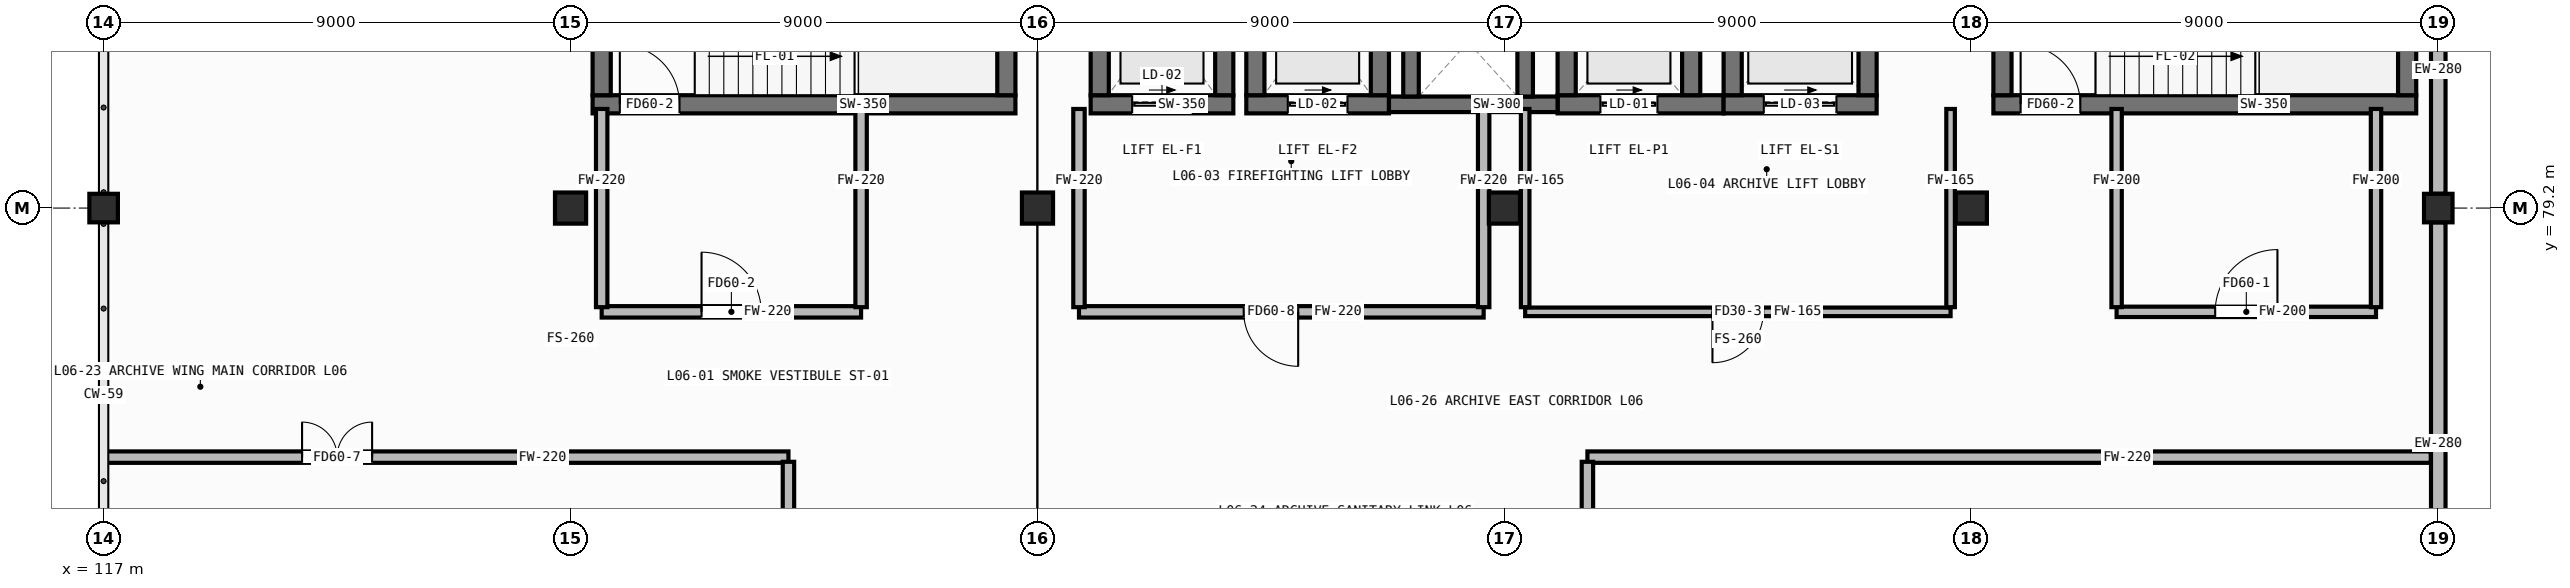
"""IFC4 building model, lengths in metres.
Left out: names, types, materials, properties, quantities, classifications, styles, units other than length and angle.
Written with IfcOpenShell. Run it as: python <this file> out.ifc"""

import sys

from ifc_helpers import new_model, si_unit, direction, frame, frame_2d, origin, origin_2d, place, context, subcontext, project, spatial, rectangle, hollow_rectangle, extrude, element, fill, save


model = new_model("IFC4")
c1 = context("Model", 3, precision=1e-05, world=origin(), true_north=direction((0.0, 1.0)))
c2 = subcontext(c1, "Body", "Model", "MODEL_VIEW")
j1 = project(units=[si_unit("LENGTHUNIT", "METRE"), si_unit("PLANEANGLEUNIT", "RADIAN")], contexts=[c1])
p1 = place(None, origin())
s1 = spatial("IfcSite", under=j1, at=p1, CompositionType="ELEMENT")
p2 = place(p1, origin())
s2 = spatial("IfcBuilding", under=s1, at=p2, CompositionType="ELEMENT")
p3 = place(p2, frame((0.0, 0.0, 20.6)))
s3 = spatial("IfcBuildingStorey", under=s2, at=p3, CompositionType="ELEMENT", Elevation=20.6)
p4 = place(p3, frame((117.0, 79.2, 0.0), z_axis=(0.0, 0.0, 1.0), x_axis=(1.0, 0.0, 0.0)))
e1 = element("IfcColumn", 1, at=p4, inside=s3, PredefinedType="COLUMN", context=c2, shape_type="SweptSolid", body=[
    extrude(hollow_rectangle(XDim=0.55, YDim=0.55, WallThickness=0.022, at=origin_2d()), origin(), (0.0, 0.0, 1.0), 3.36),
])
for number, where, z_axis, x_axis in (
    (2, (126.0, 79.2, 0.0), (0.0, 0.0, 1.0), (1.0, 0.0, 0.0)),
    (3, (135.0, 79.2, 0.0), (0.0, 0.0, 1.0), (1.0, 0.0, 0.0)),
    (4, (144.0, 79.2, 0.0), (0.0, 0.0, 1.0), (1.0, 0.0, 0.0)),
    (5, (153.0, 79.2, 0.0), (0.0, 0.0, 1.0), (1.0, 0.0, 0.0)),
):
    element("IfcColumn", number, at=place(p3, frame(where, z_axis=z_axis, x_axis=x_axis)), inside=s3, PredefinedType="COLUMN", context=c2, shape_type="SweptSolid", body=[
        extrude(hollow_rectangle(XDim=0.6, YDim=0.6, WallThickness=0.025, at=origin_2d()), origin(), (0.0, 0.0, 1.0), 3.6),
    ])
p5 = place(p3, frame((162.0, 79.2, 0.0), z_axis=(0.0, 0.0, 1.0), x_axis=(1.0, 0.0, 0.0)))
e6 = element("IfcColumn", 6, at=p5, inside=s3, PredefinedType="COLUMN", context=c2, shape_type="SweptSolid", body=[
    extrude(hollow_rectangle(XDim=0.55, YDim=0.55, WallThickness=0.022, at=origin_2d()), origin(), (0.0, 0.0, 1.0), 3.6),
])
p6 = place(p3, frame((162.0, 78.925, 0.0), z_axis=(0.0, 0.0, 1.0), x_axis=(0.0, -1.0, 0.0)))
e7 = element("IfcWall", 7, at=p6, inside=s3, PredefinedType="STANDARD", context=c2, shape_type="SweptSolid", body=[
    extrude(rectangle(XDim=6.65, YDim=0.28, at=frame_2d((3.325, 0.0))), origin(), (0.0, 0.0, 1.0), 2.92),
])
p7 = place(p3, frame((162.0, 86.125, 0.0), z_axis=(0.0, 0.0, 1.0), x_axis=(0.0, -1.0, 0.0)))
e8 = element("IfcWall", 8, at=p7, inside=s3, PredefinedType="STANDARD", context=c2, shape_type="SweptSolid", body=[
    extrude(rectangle(XDim=6.65, YDim=0.28, at=frame_2d((3.325, 0.0))), origin(), (0.0, 0.0, 1.0), 2.92),
])
p8 = place(p3, frame((126.425, 81.2, 0.0), z_axis=(0.0, 0.0, 1.0), x_axis=(1.0, 0.0, 0.0)))
e9 = element("IfcWall", 9, at=p8, inside=s3, PredefinedType="SHEAR", context=c2, shape_type="SweptSolid", body=[
    extrude(rectangle(XDim=8.15, YDim=0.35, at=frame_2d((4.075, 0.0))), origin(), (0.0, 0.0, 1.0), 3.32),
])
p9 = place(p8, frame((0.525, 0.0, 0.0)))
e10 = element("IfcOpeningElement", 10, at=p9, cuts=e9, PredefinedType="OPENING", context=c2, shape_type="SweptSolid", body=[
    extrude(rectangle(XDim=1.15, YDim=2.1, at=frame_2d((0.575, 1.05))), frame((0.0, 0.187, 0.0), z_axis=(0.0, -1.0, 0.0), x_axis=(1.0, 0.0, 0.0)), (0.0, 0.0, 1.0), 0.374),
])
for number, where, z_axis, x_axis in (
    (11, (126.6, 81.375, 0.0), (0.0, 0.0, 1.0), (0.0, 1.0, 0.0)),
    (12, (134.4, 81.375, 0.0), (0.0, 0.0, 1.0), (0.0, 1.0, 0.0)),
):
    element("IfcWall", number, at=place(p3, frame(where, z_axis=z_axis, x_axis=x_axis)), inside=s3, PredefinedType="SHEAR", context=c2, shape_type="SweptSolid", body=[
        extrude(rectangle(XDim=3.55, YDim=0.35, at=frame_2d((1.775, 0.0))), origin(), (0.0, 0.0, 1.0), 3.32),
    ])
p10 = place(p3, frame((153.425, 81.2, 0.0), z_axis=(0.0, 0.0, 1.0), x_axis=(1.0, 0.0, 0.0)))
e13 = element("IfcWall", 13, at=p10, inside=s3, PredefinedType="SHEAR", context=c2, shape_type="SweptSolid", body=[
    extrude(rectangle(XDim=8.15, YDim=0.35, at=frame_2d((4.075, 0.0))), origin(), (0.0, 0.0, 1.0), 3.32),
])
p11 = place(p10, frame((0.525, 0.0, 0.0)))
e14 = element("IfcOpeningElement", 14, at=p11, cuts=e13, PredefinedType="OPENING", context=c2, shape_type="SweptSolid", body=[
    extrude(rectangle(XDim=1.15, YDim=2.1, at=frame_2d((0.575, 1.05))), frame((0.0, 0.187, 0.0), z_axis=(0.0, -1.0, 0.0), x_axis=(1.0, 0.0, 0.0)), (0.0, 0.0, 1.0), 0.374),
])
for number, where, z_axis, x_axis in (
    (15, (153.6, 81.375, 0.0), (0.0, 0.0, 1.0), (0.0, 1.0, 0.0)),
    (16, (161.4, 81.375, 0.0), (0.0, 0.0, 1.0), (0.0, 1.0, 0.0)),
):
    element("IfcWall", number, at=place(p3, frame(where, z_axis=z_axis, x_axis=x_axis)), inside=s3, PredefinedType="SHEAR", context=c2, shape_type="SweptSolid", body=[
        extrude(rectangle(XDim=3.55, YDim=0.35, at=frame_2d((1.775, 0.0))), origin(), (0.0, 0.0, 1.0), 3.32),
    ])
p12 = place(p3, frame((136.025, 81.2, 0.0), z_axis=(0.0, 0.0, 1.0), x_axis=(1.0, 0.0, 0.0)))
e17 = element("IfcWall", 17, at=p12, inside=s3, PredefinedType="SHEAR", context=c2, shape_type="SweptSolid", body=[
    extrude(rectangle(XDim=2.75, YDim=0.35, at=frame_2d((1.375, 0.0))), origin(), (0.0, 0.0, 1.0), 3.32),
])
p13 = place(p12, frame((0.8, 0.0, 0.0)))
e18 = element("IfcOpeningElement", 18, at=p13, cuts=e17, PredefinedType="OPENING", context=c2, shape_type="SweptSolid", body=[
    extrude(rectangle(XDim=1.15, YDim=2.12, at=frame_2d((0.575, 1.06))), frame((0.0, 0.187, 0.0), z_axis=(0.0, -1.0, 0.0), x_axis=(1.0, 0.0, 0.0)), (0.0, 0.0, 1.0), 0.374),
])
for number, where, z_axis, x_axis in (
    (19, (136.2, 81.375, 0.0), (0.0, 0.0, 1.0), (0.0, 1.0, 0.0)),
    (20, (138.6, 81.375, 0.0), (0.0, 0.0, 1.0), (0.0, 1.0, 0.0)),
):
    element("IfcWall", number, at=place(p3, frame(where, z_axis=z_axis, x_axis=x_axis)), inside=s3, PredefinedType="SHEAR", context=c2, shape_type="SweptSolid", body=[
        extrude(rectangle(XDim=2.85, YDim=0.35, at=frame_2d((1.425, 0.0))), origin(), (0.0, 0.0, 1.0), 3.32),
    ])
p14 = place(p3, frame((139.025, 81.2, 0.0), z_axis=(0.0, 0.0, 1.0), x_axis=(1.0, 0.0, 0.0)))
e21 = element("IfcWall", 21, at=p14, inside=s3, PredefinedType="SHEAR", context=c2, shape_type="SweptSolid", body=[
    extrude(rectangle(XDim=2.75, YDim=0.35, at=frame_2d((1.375, 0.0))), origin(), (0.0, 0.0, 1.0), 3.32),
])
p15 = place(p14, frame((0.8, 0.0, 0.0)))
e22 = element("IfcOpeningElement", 22, at=p15, cuts=e21, PredefinedType="OPENING", context=c2, shape_type="SweptSolid", body=[
    extrude(rectangle(XDim=1.15, YDim=2.12, at=frame_2d((0.575, 1.06))), frame((0.0, 0.187, 0.0), z_axis=(0.0, -1.0, 0.0), x_axis=(1.0, 0.0, 0.0)), (0.0, 0.0, 1.0), 0.374),
])
for number, where, z_axis, x_axis in (
    (23, (139.2, 81.375, 0.0), (0.0, 0.0, 1.0), (0.0, 1.0, 0.0)),
    (24, (141.6, 81.375, 0.0), (0.0, 0.0, 1.0), (0.0, 1.0, 0.0)),
):
    element("IfcWall", number, at=place(p3, frame(where, z_axis=z_axis, x_axis=x_axis)), inside=s3, PredefinedType="SHEAR", context=c2, shape_type="SweptSolid", body=[
        extrude(rectangle(XDim=2.85, YDim=0.35, at=frame_2d((1.425, 0.0))), origin(), (0.0, 0.0, 1.0), 3.32),
    ])
p16 = place(p3, frame((145.025, 81.2, 0.0), z_axis=(0.0, 0.0, 1.0), x_axis=(1.0, 0.0, 0.0)))
e25 = element("IfcWall", 25, at=p16, inside=s3, PredefinedType="SHEAR", context=c2, shape_type="SweptSolid", body=[
    extrude(rectangle(XDim=3.2, YDim=0.35, at=frame_2d((1.6, 0.0))), origin(), (0.0, 0.0, 1.0), 3.32),
])
p17 = place(p16, frame((0.825, 0.0, 0.0)))
e26 = element("IfcOpeningElement", 26, at=p17, cuts=e25, PredefinedType="OPENING", context=c2, shape_type="SweptSolid", body=[
    extrude(rectangle(XDim=1.1, YDim=2.1, at=frame_2d((0.55, 1.05))), frame((0.0, 0.187, 0.0), z_axis=(0.0, -1.0, 0.0), x_axis=(1.0, 0.0, 0.0)), (0.0, 0.0, 1.0), 0.374),
])
for number, where, z_axis, x_axis in (
    (27, (145.2, 81.375, 0.0), (0.0, 0.0, 1.0), (0.0, 1.0, 0.0)),
    (28, (147.6, 81.375, 0.0), (0.0, 0.0, 1.0), (0.0, 1.0, 0.0)),
):
    element("IfcWall", number, at=place(p3, frame(where, z_axis=z_axis, x_axis=x_axis)), inside=s3, PredefinedType="SHEAR", context=c2, shape_type="SweptSolid", body=[
        extrude(rectangle(XDim=2.45, YDim=0.35, at=frame_2d((1.225, 0.0))), origin(), (0.0, 0.0, 1.0), 3.32),
    ])
p18 = place(p3, frame((148.225, 81.2, 0.0), z_axis=(0.0, 0.0, 1.0), x_axis=(1.0, 0.0, 0.0)))
e29 = element("IfcWall", 29, at=p18, inside=s3, PredefinedType="SHEAR", context=c2, shape_type="SweptSolid", body=[
    extrude(rectangle(XDim=2.95, YDim=0.35, at=frame_2d((1.475, 0.0))), origin(), (0.0, 0.0, 1.0), 3.32),
])
p19 = place(p18, frame((0.775, 0.0, 0.0)))
e30 = element("IfcOpeningElement", 30, at=p19, cuts=e29, PredefinedType="OPENING", context=c2, shape_type="SweptSolid", body=[
    extrude(rectangle(XDim=1.4, YDim=2.15, at=frame_2d((0.7, 1.075))), frame((0.0, 0.187, 0.0), z_axis=(0.0, -1.0, 0.0), x_axis=(1.0, 0.0, 0.0)), (0.0, 0.0, 1.0), 0.374),
])
for number, where, z_axis, x_axis in (
    (31, (148.4, 81.375, 0.0), (0.0, 0.0, 1.0), (0.0, 1.0, 0.0)),
    (32, (151.0, 81.375, 0.0), (0.0, 0.0, 1.0), (0.0, 1.0, 0.0)),
):
    element("IfcWall", number, at=place(p3, frame(where, z_axis=z_axis, x_axis=x_axis)), inside=s3, PredefinedType="SHEAR", context=c2, shape_type="SweptSolid", body=[
        extrude(rectangle(XDim=3.05, YDim=0.35, at=frame_2d((1.525, 0.0))), origin(), (0.0, 0.0, 1.0), 3.32),
    ])
p20 = place(p3, frame((141.775, 81.2, 0.0), z_axis=(0.0, 0.0, 1.0), x_axis=(1.0, 0.0, 0.0)))
e33 = element("IfcWall", 33, at=p20, inside=s3, PredefinedType="SHEAR", context=c2, shape_type="SweptSolid", body=[
    extrude(rectangle(XDim=3.25, YDim=0.3, at=frame_2d((1.625, 0.0))), origin(), (0.0, 0.0, 1.0), 3.32),
])
for number, where, z_axis, x_axis in (
    (34, (142.2, 81.35, 0.0), (0.0, 0.0, 1.0), (0.0, 1.0, 0.0)),
    (35, (144.4, 81.35, 0.0), (0.0, 0.0, 1.0), (0.0, 1.0, 0.0)),
):
    element("IfcWall", number, at=place(p3, frame(where, z_axis=z_axis, x_axis=x_axis)), inside=s3, PredefinedType="SHEAR", context=c2, shape_type="SweptSolid", body=[
        extrude(rectangle(XDim=2.1, YDim=0.3, at=frame_2d((1.05, 0.0))), origin(), (0.0, 0.0, 1.0), 3.32),
    ])
p21 = place(p3, frame((126.6, 77.2, 0.0), z_axis=(0.0, 0.0, 1.0), x_axis=(1.0, 0.0, 0.0)))
e36 = element("IfcWall", 36, at=p21, inside=s3, PredefinedType="PARTITIONING", context=c2, shape_type="SweptSolid", body=[
    extrude(rectangle(XDim=5.0, YDim=0.22, at=frame_2d((2.5, 0.0))), origin(), (0.0, 0.0, 1.0), 3.32),
])
p22 = place(p21, frame((1.925, 0.0, 0.0)))
e37 = element("IfcOpeningElement", 37, at=p22, cuts=e36, PredefinedType="OPENING", context=c2, shape_type="SweptSolid", body=[
    extrude(rectangle(XDim=1.15, YDim=2.1, at=frame_2d((0.575, 1.05))), frame((0.0, 0.122, 0.0), z_axis=(0.0, -1.0, 0.0), x_axis=(1.0, 0.0, 0.0)), (0.0, 0.0, 1.0), 0.244),
])
for number, where, z_axis, x_axis in (
    (38, (126.6, 77.29, 0.0), (0.0, 0.0, 1.0), (0.0, 1.0, 0.0)),
    (39, (131.6, 77.29, 0.0), (0.0, 0.0, 1.0), (0.0, 1.0, 0.0)),
):
    element("IfcWall", number, at=place(p3, frame(where, z_axis=z_axis, x_axis=x_axis)), inside=s3, PredefinedType="PARTITIONING", context=c2, shape_type="SweptSolid", body=[
        extrude(rectangle(XDim=3.82, YDim=0.22, at=frame_2d((1.91, 0.0))), origin(), (0.0, 0.0, 1.0), 3.32),
    ])
p23 = place(p3, frame((155.8, 77.2, 0.0), z_axis=(0.0, 0.0, 1.0), x_axis=(1.0, 0.0, 0.0)))
e40 = element("IfcWall", 40, at=p23, inside=s3, PredefinedType="PARTITIONING", context=c2, shape_type="SweptSolid", body=[
    extrude(rectangle(XDim=5.0, YDim=0.2, at=frame_2d((2.5, 0.0))), origin(), (0.0, 0.0, 1.0), 3.32),
])
p24 = place(p23, frame((1.9, 0.0, 0.0)))
e41 = element("IfcOpeningElement", 41, at=p24, cuts=e40, PredefinedType="OPENING", context=c2, shape_type="SweptSolid", body=[
    extrude(rectangle(XDim=1.2, YDim=2.1, at=frame_2d((0.6, 1.05))), frame((0.0, 0.112, 0.0), z_axis=(0.0, -1.0, 0.0), x_axis=(1.0, 0.0, 0.0)), (0.0, 0.0, 1.0), 0.224),
])
for number, where, z_axis, x_axis in (
    (42, (155.8, 77.29, 0.0), (0.0, 0.0, 1.0), (0.0, 1.0, 0.0)),
    (43, (160.8, 77.29, 0.0), (0.0, 0.0, 1.0), (0.0, 1.0, 0.0)),
):
    element("IfcWall", number, at=place(p3, frame(where, z_axis=z_axis, x_axis=x_axis)), inside=s3, PredefinedType="PARTITIONING", context=c2, shape_type="SweptSolid", body=[
        extrude(rectangle(XDim=3.82, YDim=0.2, at=frame_2d((1.91, 0.0))), origin(), (0.0, 0.0, 1.0), 3.32),
    ])
p25 = place(p3, frame((135.8, 77.2, 0.0), z_axis=(0.0, 0.0, 1.0), x_axis=(1.0, 0.0, 0.0)))
e44 = element("IfcWall", 44, at=p25, inside=s3, PredefinedType="PARTITIONING", context=c2, shape_type="SweptSolid", body=[
    extrude(rectangle(XDim=7.8, YDim=0.22, at=frame_2d((3.9, 0.0))), origin(), (0.0, 0.0, 1.0), 3.32),
])
p26 = place(p25, frame((3.175, 0.0, 0.0)))
e45 = element("IfcOpeningElement", 45, at=p26, cuts=e44, PredefinedType="OPENING", context=c2, shape_type="SweptSolid", body=[
    extrude(rectangle(XDim=1.05, YDim=2.02, at=frame_2d((0.525, 1.01))), frame((0.0, 0.122, 0.0), z_axis=(0.0, -1.0, 0.0), x_axis=(1.0, 0.0, 0.0)), (0.0, 0.0, 1.0), 0.244),
])
for number, where, z_axis, x_axis in (
    (46, (135.8, 77.29, 0.0), (0.0, 0.0, 1.0), (0.0, 1.0, 0.0)),
    (47, (143.6, 77.29, 0.0), (0.0, 0.0, 1.0), (0.0, 1.0, 0.0)),
):
    element("IfcWall", number, at=place(p3, frame(where, z_axis=z_axis, x_axis=x_axis)), inside=s3, PredefinedType="PARTITIONING", context=c2, shape_type="SweptSolid", body=[
        extrude(rectangle(XDim=3.82, YDim=0.22, at=frame_2d((1.91, 0.0))), origin(), (0.0, 0.0, 1.0), 3.32),
    ])
p27 = place(p3, frame((144.4, 77.2, 0.0), z_axis=(0.0, 0.0, 1.0), x_axis=(1.0, 0.0, 0.0)))
e48 = element("IfcWall", 48, at=p27, inside=s3, PredefinedType="PARTITIONING", context=c2, shape_type="SweptSolid", body=[
    extrude(rectangle(XDim=8.2, YDim=0.165, at=frame_2d((4.1, 0.0))), origin(), (0.0, 0.0, 1.0), 3.32),
])
p28 = place(p27, frame((3.61, 0.0, 0.0)))
e49 = element("IfcOpeningElement", 49, at=p28, cuts=e48, PredefinedType="OPENING", context=c2, shape_type="SweptSolid", body=[
    extrude(rectangle(XDim=0.98, YDim=2.02, at=frame_2d((0.49, 1.01))), frame((0.0, 0.094, 0.0), z_axis=(0.0, -1.0, 0.0), x_axis=(1.0, 0.0, 0.0)), (0.0, 0.0, 1.0), 0.189),
])
for number, where, z_axis, x_axis in (
    (50, (144.4, 77.29, 0.0), (0.0, 0.0, 1.0), (0.0, 1.0, 0.0)),
    (51, (152.6, 77.29, 0.0), (0.0, 0.0, 1.0), (0.0, 1.0, 0.0)),
):
    element("IfcWall", number, at=place(p3, frame(where, z_axis=z_axis, x_axis=x_axis)), inside=s3, PredefinedType="PARTITIONING", context=c2, shape_type="SweptSolid", body=[
        extrude(rectangle(XDim=3.82, YDim=0.165, at=frame_2d((1.91, 0.0))), origin(), (0.0, 0.0, 1.0), 3.32),
    ])
p29 = place(p3, frame((117.035, 74.4, 0.0), z_axis=(0.0, 0.0, 1.0), x_axis=(1.0, 0.0, 0.0)))
e52 = element("IfcWall", 52, at=p29, inside=s3, PredefinedType="PARTITIONING", context=c2, shape_type="SweptSolid", body=[
    extrude(rectangle(XDim=13.165, YDim=0.22, at=frame_2d((6.583, 0.0))), origin(), (0.0, 0.0, 1.0), 3.36),
])
p30 = place(p29, frame((3.79, 0.0, 0.0)))
e53 = element("IfcOpeningElement", 53, at=p30, cuts=e52, PredefinedType="OPENING", context=c2, shape_type="SweptSolid", body=[
    extrude(rectangle(XDim=1.35, YDim=2.08, at=frame_2d((0.675, 1.04))), frame((0.0, 0.122, 0.0), z_axis=(0.0, -1.0, 0.0), x_axis=(1.0, 0.0, 0.0)), (0.0, 0.0, 1.0), 0.244),
])
p31 = place(p3, frame((130.2, 65.49, 0.0), z_axis=(0.0, 0.0, 1.0), x_axis=(0.0, 1.0, 0.0)))
e54 = element("IfcWall", 54, at=p31, inside=s3, PredefinedType="PARTITIONING", context=c2, shape_type="SweptSolid", body=[
    extrude(rectangle(XDim=8.82, YDim=0.22, at=frame_2d((4.41, 0.0))), origin(), (0.0, 0.0, 1.0), 3.32),
])
p32 = place(p3, frame((145.6, 74.4, 0.0), z_axis=(0.0, 0.0, 1.0), x_axis=(1.0, 0.0, 0.0)))
e55 = element("IfcWall", 55, at=p32, inside=s3, PredefinedType="PARTITIONING", context=c2, shape_type="SweptSolid", body=[
    extrude(rectangle(XDim=16.255, YDim=0.22, at=frame_2d((8.127, 0.0))), origin(), (0.0, 0.0, 1.0), 3.32),
])
p33 = place(p3, frame((145.6, 57.745, 0.0), z_axis=(0.0, 0.0, 1.0), x_axis=(0.0, 1.0, 0.0)))
e56 = element("IfcWall", 56, at=p33, inside=s3, PredefinedType="PARTITIONING", context=c2, shape_type="SweptSolid", body=[
    extrude(rectangle(XDim=16.565, YDim=0.22, at=frame_2d((8.282, 0.0))), origin(), (0.0, 0.0, 1.0), 3.32),
])
p34 = place(p33, frame((7.855, 0.0, 0.0)))
e57 = element("IfcOpeningElement", 57, at=p34, cuts=e56, PredefinedType="OPENING", context=c2, shape_type="SweptSolid", body=[
    extrude(rectangle(XDim=1.5, YDim=2.1, at=frame_2d((0.75, 1.05))), frame((0.0, 0.122, 0.0), z_axis=(0.0, -1.0, 0.0), x_axis=(1.0, 0.0, 0.0)), (0.0, 0.0, 1.0), 0.244),
])
p35 = place(p9, origin())
e58 = element("IfcDoor", 58, at=p35, inside=s3, OperationType="SINGLE_SWING_LEFT", PredefinedType="DOOR", context=c2, shape_type="SweptSolid", body=[
    extrude(rectangle(XDim=1.15, YDim=2.1, at=frame_2d((0.575, 1.05))), frame((0.0, 0.025, 0.0), z_axis=(0.0, -1.0, 0.0), x_axis=(1.0, 0.0, 0.0)), (0.0, 0.0, 1.0), 0.05),
])
fill(e10, e58)
p36 = place(p11, origin())
e59 = element("IfcDoor", 59, at=p36, inside=s3, OperationType="SINGLE_SWING_LEFT", PredefinedType="DOOR", context=c2, shape_type="SweptSolid", body=[
    extrude(rectangle(XDim=1.15, YDim=2.1, at=frame_2d((0.575, 1.05))), frame((0.0, 0.025, 0.0), z_axis=(0.0, -1.0, 0.0), x_axis=(1.0, 0.0, 0.0)), (0.0, 0.0, 1.0), 0.05),
])
fill(e14, e59)
p37 = place(p13, origin())
e60 = element("IfcDoor", 60, at=p37, inside=s3, OperationType="SLIDING_TO_LEFT", PredefinedType="DOOR", context=c2, shape_type="SweptSolid", body=[
    extrude(rectangle(XDim=1.15, YDim=2.12, at=frame_2d((0.575, 1.06))), frame((0.0, 0.025, 0.0), z_axis=(0.0, -1.0, 0.0), x_axis=(1.0, 0.0, 0.0)), (0.0, 0.0, 1.0), 0.05),
])
fill(e18, e60)
p38 = place(p15, origin())
e61 = element("IfcDoor", 61, at=p38, inside=s3, OperationType="SLIDING_TO_LEFT", PredefinedType="DOOR", context=c2, shape_type="SweptSolid", body=[
    extrude(rectangle(XDim=1.15, YDim=2.12, at=frame_2d((0.575, 1.06))), frame((0.0, 0.025, 0.0), z_axis=(0.0, -1.0, 0.0), x_axis=(1.0, 0.0, 0.0)), (0.0, 0.0, 1.0), 0.05),
])
fill(e22, e61)
p39 = place(p17, origin())
e62 = element("IfcDoor", 62, at=p39, inside=s3, OperationType="SLIDING_TO_LEFT", PredefinedType="DOOR", context=c2, shape_type="SweptSolid", body=[
    extrude(rectangle(XDim=1.1, YDim=2.1, at=frame_2d((0.55, 1.05))), frame((0.0, 0.025, 0.0), z_axis=(0.0, -1.0, 0.0), x_axis=(1.0, 0.0, 0.0)), (0.0, 0.0, 1.0), 0.05),
])
fill(e26, e62)
p40 = place(p19, origin())
e63 = element("IfcDoor", 63, at=p40, inside=s3, OperationType="SLIDING_TO_LEFT", PredefinedType="DOOR", context=c2, shape_type="SweptSolid", body=[
    extrude(rectangle(XDim=1.4, YDim=2.15, at=frame_2d((0.7, 1.075))), frame((0.0, 0.025, 0.0), z_axis=(0.0, -1.0, 0.0), x_axis=(1.0, 0.0, 0.0)), (0.0, 0.0, 1.0), 0.05),
])
fill(e30, e63)
p41 = place(p22, origin())
e64 = element("IfcDoor", 64, at=p41, inside=s3, OperationType="SINGLE_SWING_LEFT", PredefinedType="DOOR", context=c2, shape_type="SweptSolid", body=[
    extrude(rectangle(XDim=1.15, YDim=2.1, at=frame_2d((0.575, 1.05))), frame((0.0, 0.025, 0.0), z_axis=(0.0, -1.0, 0.0), x_axis=(1.0, 0.0, 0.0)), (0.0, 0.0, 1.0), 0.05),
])
fill(e37, e64)
p42 = place(p24, origin())
e65 = element("IfcDoor", 65, at=p42, inside=s3, OperationType="SINGLE_SWING_RIGHT", PredefinedType="DOOR", context=c2, shape_type="SweptSolid", body=[
    extrude(rectangle(XDim=1.2, YDim=2.1, at=frame_2d((0.6, 1.05))), frame((0.0, 0.025, 0.0), z_axis=(0.0, -1.0, 0.0), x_axis=(1.0, 0.0, 0.0)), (0.0, 0.0, 1.0), 0.05),
])
fill(e41, e65)
p43 = place(p26, frame((1.05, 0.0, 0.0), z_axis=(0.0, 0.0, 1.0), x_axis=(-1.0, 0.0, 0.0)))
e66 = element("IfcDoor", 66, at=p43, inside=s3, OperationType="SINGLE_SWING_LEFT", PredefinedType="DOOR", context=c2, shape_type="SweptSolid", body=[
    extrude(rectangle(XDim=1.05, YDim=2.02, at=frame_2d((0.525, 1.01))), frame((0.0, 0.025, 0.0), z_axis=(0.0, -1.0, 0.0), x_axis=(1.0, 0.0, 0.0)), (0.0, 0.0, 1.0), 0.05),
])
fill(e45, e66)
p44 = place(p28, frame((0.98, 0.0, 0.0), z_axis=(0.0, 0.0, 1.0), x_axis=(-1.0, 0.0, 0.0)))
e67 = element("IfcDoor", 67, at=p44, inside=s3, OperationType="SINGLE_SWING_RIGHT", PredefinedType="DOOR", context=c2, shape_type="SweptSolid", body=[
    extrude(rectangle(XDim=0.98, YDim=2.02, at=frame_2d((0.49, 1.01))), frame((0.0, 0.025, 0.0), z_axis=(0.0, -1.0, 0.0), x_axis=(1.0, 0.0, 0.0)), (0.0, 0.0, 1.0), 0.05),
])
fill(e49, e67)
p45 = place(p30, origin())
e68 = element("IfcDoor", 68, at=p45, inside=s3, OperationType="DOUBLE_DOOR_SINGLE_SWING", PredefinedType="DOOR", context=c2, shape_type="SweptSolid", body=[
    extrude(rectangle(XDim=1.35, YDim=2.08, at=frame_2d((0.675, 1.04))), frame((0.0, 0.025, 0.0), z_axis=(0.0, -1.0, 0.0), x_axis=(1.0, 0.0, 0.0)), (0.0, 0.0, 1.0), 0.05),
])
fill(e53, e68)
save(model, sys.argv[1])
